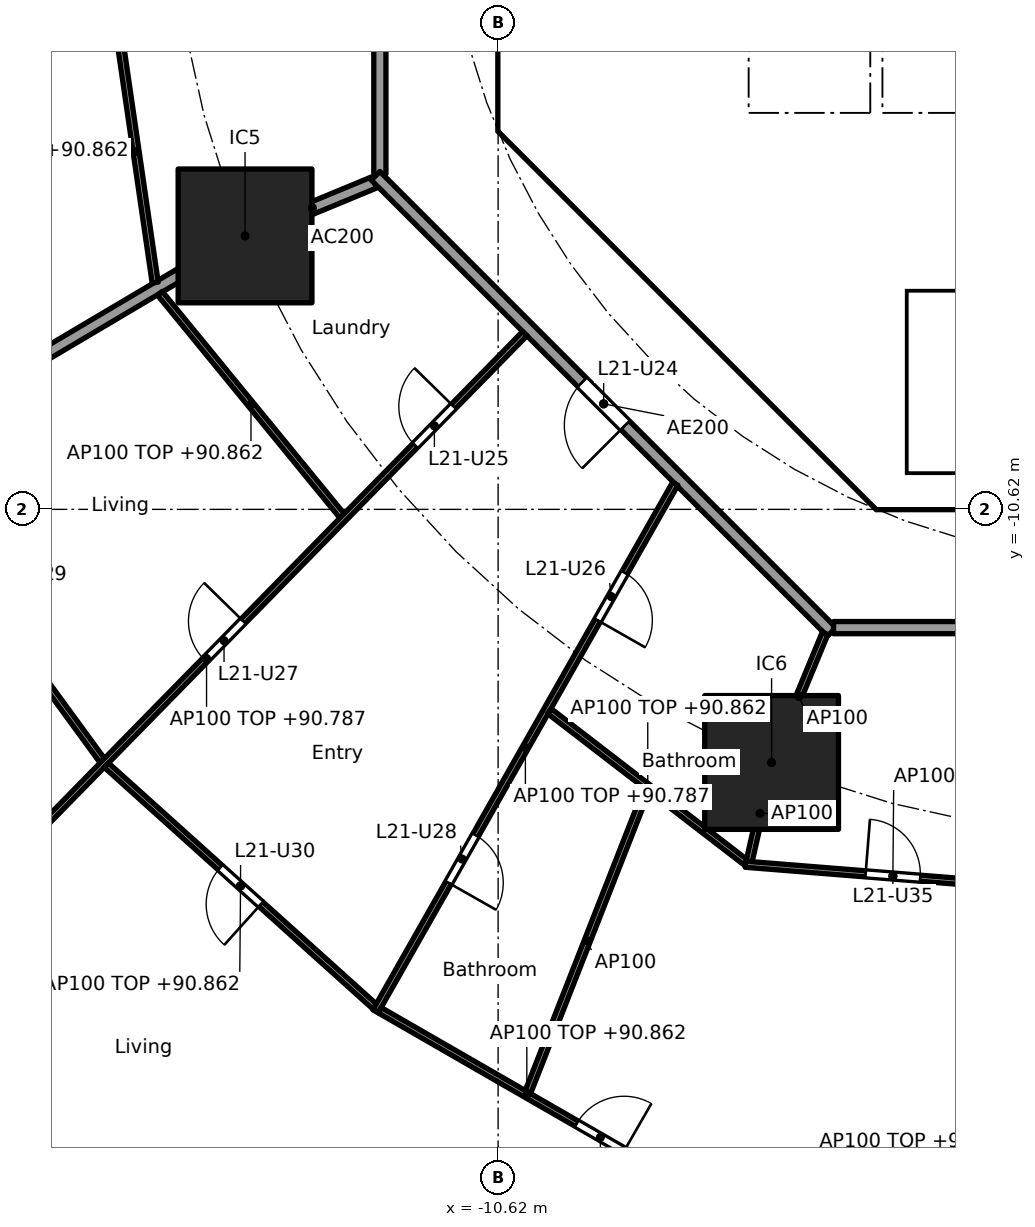
"""IFC4 building model, lengths in metres.
Left out: names, types, materials, properties, quantities, classifications, styles, units other than length and angle.
Written with IfcOpenShell. Run it as: python <this file> out.ifc"""

import sys

from ifc_helpers import new_model, si_unit, direction, frame, frame_2d, origin, origin_2d, place, context, subcontext, project, spatial, polyline, rectangle, outline, extrude, element, fill, save


model = new_model("IFC4")
c1 = context("Model", 3, precision=1e-05, world=origin(), true_north=direction((0.0, 1.0)))
c2 = subcontext(c1, "Body", "Model", "MODEL_VIEW")
j1 = project(units=[si_unit("LENGTHUNIT", "METRE"), si_unit("PLANEANGLEUNIT", "RADIAN")], contexts=[c1])
p1 = place(None, origin())
s1 = spatial("IfcSite", under=j1, at=p1, CompositionType="ELEMENT")
p2 = place(p1, origin())
s2 = spatial("IfcBuilding", under=s1, at=p2, CompositionType="ELEMENT")
p3 = place(p2, frame((0.0, 0.0, 88.1)))
s3 = spatial("IfcBuildingStorey", under=s2, at=p3, CompositionType="ELEMENT", Elevation=88.1)
for number, where, z_axis, x_axis in (
    (1, (-14.782, -6.123, 0.0), (0.0, 0.0, 1.0), (1.0, 0.0, 0.0)),
    (2, (-6.123, -14.782, 0.0), (0.0, 0.0, 1.0), (1.0, 0.0, 0.0)),
):
    element("IfcColumn", number, at=place(p3, frame(where, z_axis=z_axis, x_axis=x_axis)), inside=s3, PredefinedType="COLUMN", context=c2, shape_type="SweptSolid", body=[
        extrude(rectangle(XDim=2.2, YDim=2.2, at=origin_2d()), origin(), (0.0, 0.0, 1.0), 3.7),
    ])
p4 = place(p3, frame((-10.325, 3.801, 0.0), z_axis=(0.0, 0.0, 1.0), x_axis=(0.0, -1.0, 0.0)))
e3 = element("IfcWall", 3, at=p4, inside=s3, PredefinedType="SHEAR", context=c2, shape_type="SweptSolid", body=[
    extrude(rectangle(XDim=7.602, YDim=0.6, at=frame_2d((3.801, 0.0))), origin(), (0.0, 0.0, 1.0), 3.44),
])
p5 = place(p4, frame((0.651, 0.0, 0.0)))
e4 = element("IfcOpeningElement", 4, at=p5, cuts=e3, PredefinedType="OPENING", context=c2, shape_type="SweptSolid", body=[
    extrude(rectangle(XDim=1.5, YDim=2.1, at=frame_2d((0.75, 1.05))), frame((0.0, 0.31, 0.0), z_axis=(0.0, -1.0, 0.0), x_axis=(1.0, 0.0, 0.0)), (0.0, 0.0, 1.0), 0.62),
])
p6 = place(p4, frame((5.451, 0.0, 0.0)))
e5 = element("IfcOpeningElement", 5, at=p6, cuts=e3, PredefinedType="OPENING", context=c2, shape_type="SweptSolid", body=[
    extrude(rectangle(XDim=1.5, YDim=2.1, at=frame_2d((0.75, 1.05))), frame((0.0, 0.31, 0.0), z_axis=(0.0, -1.0, 0.0), x_axis=(1.0, 0.0, 0.0)), (0.0, 0.0, 1.0), 0.62),
])
p7 = place(p3, frame((-9.988, -4.613, 0.0), z_axis=(0.0, 0.0, 1.0), x_axis=(0.707106781187, -0.707106781187, 0.0)))
e6 = element("IfcWall", 6, at=p7, inside=s3, PredefinedType="SHEAR", context=c2, shape_type="SweptSolid", body=[
    extrude(rectangle(XDim=7.602, YDim=0.6, at=frame_2d((3.801, 0.0))), origin(), (0.0, 0.0, 1.0), 3.44),
])
p8 = place(p7, frame((6.151, 0.0, 0.0)))
e7 = element("IfcOpeningElement", 7, at=p8, cuts=e6, PredefinedType="OPENING", context=c2, shape_type="SweptSolid", body=[
    extrude(rectangle(XDim=1.1, YDim=2.1, at=frame_2d((0.55, 1.05))), frame((0.0, 0.31, 0.0), z_axis=(0.0, -1.0, 0.0), x_axis=(1.0, 0.0, 0.0)), (0.0, 0.0, 1.0), 0.62),
])
p9 = place(p3, frame((-6.2, -7.827, 0.0), z_axis=(0.0, 0.0, 1.0), x_axis=(0.0, 1.0, 0.0)))
e8 = element("IfcWall", 8, at=p9, inside=s3, PredefinedType="PARTITIONING", context=c2, shape_type="SweptSolid", body=[
    extrude(rectangle(XDim=3.527, YDim=0.15, at=frame_2d((1.763, 0.0))), origin(), (0.0, 0.0, 1.0), 3.44),
])
p10 = place(p9, frame((2.365, 0.0, 0.0)))
e9 = element("IfcOpeningElement", 9, at=p10, cuts=e8, PredefinedType="OPENING", context=c2, shape_type="SweptSolid", body=[
    extrude(rectangle(XDim=0.9, YDim=2.1, at=frame_2d((0.45, 1.05))), frame((0.0, 0.085, 0.0), z_axis=(0.0, -1.0, 0.0), x_axis=(1.0, 0.0, 0.0)), (0.0, 0.0, 1.0), 0.17),
])
p11 = place(p9, frame((0.489, 0.0, 0.0)))
e10 = element("IfcOpeningElement", 10, at=p11, cuts=e8, PredefinedType="OPENING", context=c2, shape_type="SweptSolid", body=[
    extrude(rectangle(XDim=0.9, YDim=2.1, at=frame_2d((0.45, 1.05))), frame((0.0, 0.085, 0.0), z_axis=(0.0, -1.0, 0.0), x_axis=(1.0, 0.0, 0.0)), (0.0, 0.0, 1.0), 0.17),
])
p12 = place(p3, frame((-4.0, -6.5, 0.0), z_axis=(0.0, 0.0, 1.0), x_axis=(0.0, 1.0, 0.0)))
e11 = element("IfcWall", 11, at=p12, inside=s3, PredefinedType="SOLIDWALL", context=c2, shape_type="SweptSolid", body=[
    extrude(rectangle(XDim=2.2, YDim=0.2, at=frame_2d((1.1, 0.0))), origin(), (0.0, 0.0, 1.0), 3.44),
])
p13 = place(p12, frame((0.65, 0.0, 0.0)))
e12 = element("IfcOpeningElement", 12, at=p13, cuts=e11, PredefinedType="OPENING", context=c2, shape_type="SweptSolid", body=[
    extrude(rectangle(XDim=0.9, YDim=2.1, at=frame_2d((0.45, 1.05))), frame((0.0, 0.11, 0.0), z_axis=(0.0, -1.0, 0.0), x_axis=(1.0, 0.0, 0.0)), (0.0, 0.0, 1.0), 0.22),
])
p14 = place(p3, origin())
e13 = element("IfcWall", 13, at=p14, inside=s3, PredefinedType="SHEAR", context=c2, shape_type="SweptSolid", body=[
    extrude(outline(polyline([(-10.625, -3.801), (-10.025, -3.801), (-10.025, -4.152), (-9.776, -4.401), (-10.2, -4.825), (-10.625, -4.401), (-10.625, -3.801)])), origin(), (0.0, 0.0, 1.0), 3.44),
])
p15 = place(p3, origin())
e14 = element("IfcWall", 14, at=p15, inside=s3, PredefinedType="SHEAR", context=c2, shape_type="SweptSolid", body=[
    extrude(outline(polyline([(-4.152, -10.025), (4.152, -10.025), (4.401, -9.776), (4.825, -10.2), (4.401, -10.625), (-4.401, -10.625), (-4.825, -10.2), (-4.401, -9.776), (-4.152, -10.025)])), origin(), (0.0, 0.0, 1.0), 3.44),
])
p16 = place(p3, origin())
e15 = element("IfcWall", 15, at=p16, inside=s3, PredefinedType="SOLIDWALL", context=c2, shape_type="SweptSolid", body=[
    extrude(outline(polyline([(-6.7, -2.1), (-6.5, -2.1), (-6.5, -4.1), (-4.5, -4.1), (-4.5, -2.1), (-4.3, -2.1), (-4.3, -4.1), (-2.3, -4.1), (-2.3, -2.1), (-2.1, -2.1), (-2.1, -4.1), (-0.1, -4.1), (-0.1, -2.1), (0.1, -2.1), (0.1, -4.1), (2.1, -4.1), (2.1, -2.1), (2.3, -2.1), (2.3, -4.1), (4.3, -4.1), (4.3, -2.1), (4.5, -2.1), (4.5, -4.1), (6.5, -4.1), (6.5, -2.1), (6.7, -2.1), (6.7, -4.3), (-6.7, -4.3), (-6.7, -2.1)])), origin(), (0.0, 0.0, 1.0), 3.44),
])
p17 = place(p3, frame((-10.025, -4.0, 0.0), z_axis=(0.0, 0.0, 1.0), x_axis=(1.0, 0.0, 0.0)))
e16 = element("IfcWall", 16, at=p17, inside=s3, PredefinedType="PARTITIONING", context=c2, shape_type="SweptSolid", body=[
    extrude(rectangle(XDim=3.325, YDim=0.2, at=frame_2d((1.662, 0.0))), origin(), (0.0, 0.0, 1.0), 3.44),
])
p18 = place(p3, frame((-8.301, -5.8, 0.0), z_axis=(0.0, 0.0, 1.0), x_axis=(1.0, 0.0, 0.0)))
e17 = element("IfcWall", 17, at=p18, inside=s3, PredefinedType="PARTITIONING", context=c2, shape_type="SweptSolid", body=[
    extrude(rectangle(XDim=2.026, YDim=0.15, at=frame_2d((1.013, 0.0))), origin(), (0.0, 0.0, 1.0), 3.44),
])
p19 = place(p3, origin())
e18 = element("IfcWall", 18, at=p19, inside=s3, PredefinedType="SOLIDWALL", context=c2, shape_type="SweptSolid", body=[
    extrude(outline(polyline([(-3.9, -10.025), (-4.1, -10.025), (-4.1, -7.025), (-3.9, -7.025), (-3.9, -10.025)])), origin(), (0.0, 0.0, 1.0), 3.44),
])
p20 = place(p3, origin())
e19 = element("IfcWall", 19, at=p20, inside=s3, PredefinedType="SOLIDWALL", context=c2, shape_type="SweptSolid", body=[
    extrude(outline(polyline([(4.1, -7.025), (-4.1, -7.025), (-4.1, -6.5), (4.1, -6.5), (4.1, -7.025)])), origin(), (0.0, 0.0, 1.0), 3.44),
])
p21 = place(p3, frame((-12.657, -5.243, 0.0), z_axis=(0.0, 0.0, 1.0), x_axis=(-0.923876145736, -0.382691608661, 0.0)))
e20 = element("IfcWall", 20, at=p21, inside=s3, PredefinedType="PARTITIONING", context=c2, shape_type="SweptSolid", body=[
    extrude(rectangle(XDim=2.2, YDim=0.2, at=frame_2d((1.1, 0.0))), origin(), (0.0, 0.0, 1.0), 3.44),
])
p22 = place(p3, frame((-14.825, -6.148, 0.0), z_axis=(0.0, 0.0, 1.0), x_axis=(-0.860400431487, -0.509618580408, 0.0)))
e21 = element("IfcWall", 21, at=p22, inside=s3, PredefinedType="PARTITIONING", context=c2, shape_type="SweptSolid", body=[
    extrude(rectangle(XDim=11.688, YDim=0.2, at=frame_2d((5.844, 0.0))), origin(), (0.0, 0.0, 1.0), 2.762),
])
p23 = place(p3, frame((-12.565, 5.304, 0.0), z_axis=(0.0, 0.0, 1.0), x_axis=(0.0, -1.0, 0.0)))
e22 = element("IfcWall", 22, at=p23, inside=s3, PredefinedType="PARTITIONING", context=c2, shape_type="SweptSolid", body=[
    extrude(rectangle(XDim=10.409, YDim=0.2, at=frame_2d((5.205, 0.0))), origin(), (0.0, 0.0, 1.0), 3.44),
])
p24 = place(p23, frame((3.07, 0.0, 0.0)))
e23 = element("IfcOpeningElement", 23, at=p24, cuts=e22, PredefinedType="OPENING", context=c2, shape_type="SweptSolid", body=[
    extrude(rectangle(XDim=1.0, YDim=2.1, at=frame_2d((0.5, 1.05))), frame((0.0, 0.11, 0.0), z_axis=(0.0, -1.0, 0.0), x_axis=(1.0, 0.0, 0.0)), (0.0, 0.0, 1.0), 0.22),
])
p25 = place(p3, frame((-12.635, -5.134, 0.0), z_axis=(0.0, 0.0, 1.0), x_axis=(0.707106781187, -0.707106781187, 0.0)))
e24 = element("IfcWall", 24, at=p25, inside=s3, PredefinedType="PARTITIONING", context=c2, shape_type="SweptSolid", body=[
    extrude(rectangle(XDim=10.609, YDim=0.2, at=frame_2d((5.305, 0.0))), origin(), (0.0, 0.0, 1.0), 3.44),
])
p26 = place(p25, frame((4.804, 0.0, 0.0)))
e25 = element("IfcOpeningElement", 25, at=p26, cuts=e24, PredefinedType="OPENING", context=c2, shape_type="SweptSolid", body=[
    extrude(rectangle(XDim=1.0, YDim=2.1, at=frame_2d((0.5, 1.05))), frame((0.0, 0.11, 0.0), z_axis=(0.0, -1.0, 0.0), x_axis=(1.0, 0.0, 0.0)), (0.0, 0.0, 1.0), 0.22),
])
p27 = place(p3, frame((-5.104, -12.565, 0.0), z_axis=(0.0, 0.0, 1.0), x_axis=(1.0, 0.0, 0.0)))
e26 = element("IfcWall", 26, at=p27, inside=s3, PredefinedType="PARTITIONING", context=c2, shape_type="SweptSolid", body=[
    extrude(rectangle(XDim=10.409, YDim=0.2, at=frame_2d((5.205, 0.0))), origin(), (0.0, 0.0, 1.0), 3.44),
])
p28 = place(p3, frame((-16.888, -2.577, 0.0), z_axis=(0.0, 0.0, 1.0), x_axis=(0.144228053649, -0.989544475272, 0.0)))
e27 = element("IfcWall", 27, at=p28, inside=s3, PredefinedType="PARTITIONING", context=c2, shape_type="SweptSolid", body=[
    extrude(rectangle(XDim=4.359, YDim=0.1, at=frame_2d((2.179, 0.0))), origin(), (0.0, 0.0, 1.0), 2.762),
])
p29 = place(p3, frame((-16.182, -7.067, 0.0), z_axis=(0.0, 0.0, 1.0), x_axis=(0.633400832951, -0.773823871962, 0.0)))
e28 = element("IfcWall", 28, at=p29, inside=s3, PredefinedType="PARTITIONING", context=c2, shape_type="SweptSolid", body=[
    extrude(rectangle(XDim=4.729, YDim=0.1, at=frame_2d((2.365, 0.0))), origin(), (0.0, 0.0, 1.0), 2.762),
])
p30 = place(p3, frame((-20.76, -9.779, 0.0), z_axis=(0.0, 0.0, 1.0), x_axis=(0.589597019189, -0.807697564045, 0.0)))
e29 = element("IfcWall", 29, at=p30, inside=s3, PredefinedType="PARTITIONING", context=c2, shape_type="SweptSolid", body=[
    extrude(rectangle(XDim=6.158, YDim=0.1, at=frame_2d((3.079, 0.0))), origin(), (0.0, 0.0, 1.0), 2.762),
])
p31 = place(p30, frame((2.629, 0.0, 0.0)))
e30 = element("IfcOpeningElement", 30, at=p31, cuts=e29, PredefinedType="OPENING", context=c2, shape_type="SweptSolid", body=[
    extrude(rectangle(XDim=0.9, YDim=2.1, at=frame_2d((0.45, 1.05))), frame((0.0, 0.06, 0.0), z_axis=(0.0, -1.0, 0.0), x_axis=(1.0, 0.0, 0.0)), (0.0, 0.0, 1.0), 0.12),
])
p32 = place(p3, frame((-10.181, -7.729, 0.0), z_axis=(0.0, 0.0, 1.0), x_axis=(-0.699708106083, -0.714428839201, 0.0)))
e31 = element("IfcWall", 31, at=p32, inside=s3, PredefinedType="PARTITIONING", context=c2, shape_type="SweptSolid", body=[
    extrude(rectangle(XDim=14.959, YDim=0.1, at=frame_2d((7.48, 0.0))), origin(), (0.0, 0.0, 1.0), 2.687),
])
p33 = place(p32, frame((1.675, 0.0, 0.0)))
e32 = element("IfcOpeningElement", 32, at=p33, cuts=e31, PredefinedType="OPENING", context=c2, shape_type="SweptSolid", body=[
    extrude(rectangle(XDim=0.9, YDim=2.1, at=frame_2d((0.45, 1.05))), frame((0.0, 0.06, 0.0), z_axis=(0.0, -1.0, 0.0), x_axis=(1.0, 0.0, 0.0)), (0.0, 0.0, 1.0), 0.12),
])
p34 = place(p32, frame((6.619, 0.0, 0.0)))
e33 = element("IfcOpeningElement", 33, at=p34, cuts=e31, PredefinedType="OPENING", context=c2, shape_type="SweptSolid", body=[
    extrude(rectangle(XDim=0.9, YDim=2.1, at=frame_2d((0.45, 1.05))), frame((0.0, 0.06, 0.0), z_axis=(0.0, -1.0, 0.0), x_axis=(1.0, 0.0, 0.0)), (0.0, 0.0, 1.0), 0.12),
])
p35 = place(p3, frame((-17.063, -14.827, 0.0), z_axis=(0.0, 0.0, 1.0), x_axis=(0.743478142868, -0.668760234373, 0.0)))
e34 = element("IfcWall", 34, at=p35, inside=s3, PredefinedType="PARTITIONING", context=c2, shape_type="SweptSolid", body=[
    extrude(rectangle(XDim=5.937, YDim=0.1, at=frame_2d((2.969, 0.0))), origin(), (0.0, 0.0, 1.0), 2.762),
])
p36 = place(p35, frame((2.519, 0.0, 0.0)))
e35 = element("IfcOpeningElement", 35, at=p36, cuts=e34, PredefinedType="OPENING", context=c2, shape_type="SweptSolid", body=[
    extrude(rectangle(XDim=0.9, YDim=2.1, at=frame_2d((0.45, 1.05))), frame((0.0, 0.06, 0.0), z_axis=(0.0, -1.0, 0.0), x_axis=(1.0, 0.0, 0.0)), (0.0, 0.0, 1.0), 0.12),
])
p37 = place(p3, frame((-7.707, -10.198, 0.0), z_axis=(0.0, 0.0, 1.0), x_axis=(-0.493963587489, -0.869482589955, 0.0)))
e36 = element("IfcWall", 36, at=p37, inside=s3, PredefinedType="PARTITIONING", context=c2, shape_type="SweptSolid", body=[
    extrude(rectangle(XDim=9.978, YDim=0.1, at=frame_2d((4.989, 0.0))), origin(), (0.0, 0.0, 1.0), 2.687),
])
p38 = place(p37, frame((1.684, 0.0, 0.0)))
e37 = element("IfcOpeningElement", 37, at=p38, cuts=e36, PredefinedType="OPENING", context=c2, shape_type="SweptSolid", body=[
    extrude(rectangle(XDim=0.9, YDim=2.1, at=frame_2d((0.45, 1.05))), frame((0.0, 0.06, 0.0), z_axis=(0.0, -1.0, 0.0), x_axis=(1.0, 0.0, 0.0)), (0.0, 0.0, 1.0), 0.12),
])
p39 = place(p37, frame((6.648, 0.0, 0.0)))
e38 = element("IfcOpeningElement", 38, at=p39, cuts=e36, PredefinedType="OPENING", context=c2, shape_type="SweptSolid", body=[
    extrude(rectangle(XDim=0.9, YDim=2.1, at=frame_2d((0.45, 1.05))), frame((0.0, 0.06, 0.0), z_axis=(0.0, -1.0, 0.0), x_axis=(1.0, 0.0, 0.0)), (0.0, 0.0, 1.0), 0.12),
])
p40 = place(p3, frame((-9.775, -13.939, 0.0), z_axis=(0.0, 0.0, 1.0), x_axis=(0.792156642473, -0.61031783014, 0.0)))
e39 = element("IfcWall", 39, at=p40, inside=s3, PredefinedType="PARTITIONING", context=c2, shape_type="SweptSolid", body=[
    extrude(rectangle(XDim=4.08, YDim=0.1, at=frame_2d((2.04, 0.0))), origin(), (0.0, 0.0, 1.0), 2.762),
])
p41 = place(p3, frame((-12.568, -18.856, 0.0), z_axis=(0.0, 0.0, 1.0), x_axis=(0.866532513598, -0.499120629585, 0.0)))
e40 = element("IfcWall", 40, at=p41, inside=s3, PredefinedType="PARTITIONING", context=c2, shape_type="SweptSolid", body=[
    extrude(rectangle(XDim=5.585, YDim=0.1, at=frame_2d((2.792, 0.0))), origin(), (0.0, 0.0, 1.0), 2.762),
])
p42 = place(p41, frame((3.739, 0.0, 0.0)))
e41 = element("IfcOpeningElement", 41, at=p42, cuts=e40, PredefinedType="OPENING", context=c2, shape_type="SweptSolid", body=[
    extrude(rectangle(XDim=0.9, YDim=2.1, at=frame_2d((0.45, 1.05))), frame((0.0, 0.06, 0.0), z_axis=(0.0, -1.0, 0.0), x_axis=(1.0, 0.0, 0.0)), (0.0, 0.0, 1.0), 0.12),
])
p43 = place(p3, frame((-8.177, -15.231, 0.0), z_axis=(0.0, 0.0, 1.0), x_axis=(-0.365520869553, -0.930803144559, 0.0)))
e42 = element("IfcWall", 42, at=p43, inside=s3, PredefinedType="PARTITIONING", context=c2, shape_type="SweptSolid", body=[
    extrude(rectangle(XDim=5.342, YDim=0.1, at=frame_2d((2.671, 0.0))), origin(), (0.0, 0.0, 1.0), 3.44),
])
p44 = place(p3, frame((-5.243, -12.657, 0.0), z_axis=(0.0, 0.0, 1.0), x_axis=(-0.382719158442, -0.923864733477, 0.0)))
e43 = element("IfcWall", 43, at=p44, inside=s3, PredefinedType="PARTITIONING", context=c2, shape_type="SweptSolid", body=[
    extrude(rectangle(XDim=2.25, YDim=0.1, at=frame_2d((1.125, 0.0))), origin(), (0.0, 0.0, 1.0), 3.44),
])
p45 = place(p3, frame((-6.134, -14.831, 0.0), z_axis=(0.0, 0.0, 1.0), x_axis=(-0.221269290858, -0.975212746493, 0.0)))
e44 = element("IfcWall", 44, at=p45, inside=s3, PredefinedType="PARTITIONING", context=c2, shape_type="SweptSolid", body=[
    extrude(rectangle(XDim=1.62, YDim=0.1, at=frame_2d((0.81, 0.0))), origin(), (0.0, 0.0, 1.0), 3.44),
])
p46 = place(p3, frame((-6.553, -16.456, 0.0), z_axis=(0.0, 0.0, 1.0), x_axis=(0.996817033118, -0.079723286975, 0.0)))
e45 = element("IfcWall", 45, at=p46, inside=s3, PredefinedType="PARTITIONING", context=c2, shape_type="SweptSolid", body=[
    extrude(rectangle(XDim=4.866, YDim=0.1, at=frame_2d((2.433, 0.0))), origin(), (0.0, 0.0, 1.0), 2.762),
])
p47 = place(p46, frame((1.983, 0.0, 0.0)))
e46 = element("IfcOpeningElement", 46, at=p47, cuts=e45, PredefinedType="OPENING", context=c2, shape_type="SweptSolid", body=[
    extrude(rectangle(XDim=0.9, YDim=2.1, at=frame_2d((0.45, 1.05))), frame((0.0, 0.06, 0.0), z_axis=(0.0, -1.0, 0.0), x_axis=(1.0, 0.0, 0.0)), (0.0, 0.0, 1.0), 0.12),
])
p48 = place(p10, origin())
e47 = element("IfcDoor", 47, at=p48, inside=s3, OperationType="SINGLE_SWING_RIGHT", PredefinedType="DOOR", context=c2, shape_type="SweptSolid", body=[
    extrude(rectangle(XDim=0.9, YDim=2.1, at=frame_2d((0.45, 1.05))), frame((0.0, 0.025, 0.0), z_axis=(0.0, -1.0, 0.0), x_axis=(1.0, 0.0, 0.0)), (0.0, 0.0, 1.0), 0.05),
])
fill(e9, e47)
p49 = place(p11, origin())
e48 = element("IfcDoor", 48, at=p49, inside=s3, OperationType="SINGLE_SWING_RIGHT", PredefinedType="DOOR", context=c2, shape_type="SweptSolid", body=[
    extrude(rectangle(XDim=0.9, YDim=2.1, at=frame_2d((0.45, 1.05))), frame((0.0, 0.025, 0.0), z_axis=(0.0, -1.0, 0.0), x_axis=(1.0, 0.0, 0.0)), (0.0, 0.0, 1.0), 0.05),
])
fill(e10, e48)
p50 = place(p13, frame((0.9, 0.0, 0.0), x_axis=(-1.0, 0.0, 0.0)))
e49 = element("IfcDoor", 49, at=p50, inside=s3, OperationType="SINGLE_SWING_LEFT", PredefinedType="DOOR", context=c2, shape_type="SweptSolid", body=[
    extrude(rectangle(XDim=0.9, YDim=2.1, at=frame_2d((0.45, 1.05))), frame((0.0, 0.025, 0.0), z_axis=(0.0, -1.0, 0.0), x_axis=(1.0, 0.0, 0.0)), (0.0, 0.0, 1.0), 0.05),
])
fill(e12, e49)
p51 = place(p6, origin())
e50 = element("IfcDoor", 50, at=p51, inside=s3, OperationType="DOUBLE_DOOR_SINGLE_SWING", PredefinedType="DOOR", context=c2, shape_type="SweptSolid", body=[
    extrude(rectangle(XDim=1.5, YDim=2.1, at=frame_2d((0.75, 1.05))), frame((0.0, 0.025, 0.0), z_axis=(0.0, -1.0, 0.0), x_axis=(1.0, 0.0, 0.0)), (0.0, 0.0, 1.0), 0.05),
])
fill(e5, e50)
p52 = place(p8, origin())
e51 = element("IfcDoor", 51, at=p52, inside=s3, OperationType="SINGLE_SWING_LEFT", PredefinedType="DOOR", context=c2, shape_type="SweptSolid", body=[
    extrude(rectangle(XDim=1.1, YDim=2.1, at=frame_2d((0.55, 1.05))), frame((0.0, 0.025, 0.0), z_axis=(0.0, -1.0, 0.0), x_axis=(1.0, 0.0, 0.0)), (0.0, 0.0, 1.0), 0.05),
])
fill(e7, e51)
p53 = place(p26, frame((1.0, 0.0, 0.0), x_axis=(-1.0, 0.0, 0.0)))
e52 = element("IfcDoor", 52, at=p53, inside=s3, OperationType="SINGLE_SWING_LEFT", PredefinedType="DOOR", context=c2, shape_type="SweptSolid", body=[
    extrude(rectangle(XDim=1.0, YDim=2.1, at=frame_2d((0.5, 1.05))), frame((0.0, 0.025, 0.0), z_axis=(0.0, -1.0, 0.0), x_axis=(1.0, 0.0, 0.0)), (0.0, 0.0, 1.0), 0.05),
])
fill(e25, e52)
p54 = place(p33, frame((0.9, 0.0, 0.0), x_axis=(-1.0, 0.0, 0.0)))
e53 = element("IfcDoor", 53, at=p54, inside=s3, OperationType="SINGLE_SWING_RIGHT", PredefinedType="DOOR", context=c2, shape_type="SweptSolid", body=[
    extrude(rectangle(XDim=0.9, YDim=2.1, at=frame_2d((0.45, 1.05))), frame((0.0, 0.025, 0.0), z_axis=(0.0, -1.0, 0.0), x_axis=(1.0, 0.0, 0.0)), (0.0, 0.0, 1.0), 0.05),
])
fill(e32, e53)
p55 = place(p38, origin())
e54 = element("IfcDoor", 54, at=p55, inside=s3, OperationType="SINGLE_SWING_RIGHT", PredefinedType="DOOR", context=c2, shape_type="SweptSolid", body=[
    extrude(rectangle(XDim=0.9, YDim=2.1, at=frame_2d((0.45, 1.05))), frame((0.0, 0.025, 0.0), z_axis=(0.0, -1.0, 0.0), x_axis=(1.0, 0.0, 0.0)), (0.0, 0.0, 1.0), 0.05),
])
fill(e37, e54)
p56 = place(p34, frame((0.9, 0.0, 0.0), x_axis=(-1.0, 0.0, 0.0)))
e55 = element("IfcDoor", 55, at=p56, inside=s3, OperationType="SINGLE_SWING_RIGHT", PredefinedType="DOOR", context=c2, shape_type="SweptSolid", body=[
    extrude(rectangle(XDim=0.9, YDim=2.1, at=frame_2d((0.45, 1.05))), frame((0.0, 0.025, 0.0), z_axis=(0.0, -1.0, 0.0), x_axis=(1.0, 0.0, 0.0)), (0.0, 0.0, 1.0), 0.05),
])
fill(e33, e55)
p57 = place(p39, origin())
e56 = element("IfcDoor", 56, at=p57, inside=s3, OperationType="SINGLE_SWING_RIGHT", PredefinedType="DOOR", context=c2, shape_type="SweptSolid", body=[
    extrude(rectangle(XDim=0.9, YDim=2.1, at=frame_2d((0.45, 1.05))), frame((0.0, 0.025, 0.0), z_axis=(0.0, -1.0, 0.0), x_axis=(1.0, 0.0, 0.0)), (0.0, 0.0, 1.0), 0.05),
])
fill(e38, e56)
p58 = place(p36, frame((0.9, 0.0, 0.0), x_axis=(-1.0, 0.0, 0.0)))
e57 = element("IfcDoor", 57, at=p58, inside=s3, OperationType="SINGLE_SWING_LEFT", PredefinedType="DOOR", context=c2, shape_type="SweptSolid", body=[
    extrude(rectangle(XDim=0.9, YDim=2.1, at=frame_2d((0.45, 1.05))), frame((0.0, 0.025, 0.0), z_axis=(0.0, -1.0, 0.0), x_axis=(1.0, 0.0, 0.0)), (0.0, 0.0, 1.0), 0.05),
])
fill(e35, e57)
p59 = place(p42, origin())
e58 = element("IfcDoor", 58, at=p59, inside=s3, OperationType="SINGLE_SWING_RIGHT", PredefinedType="DOOR", context=c2, shape_type="SweptSolid", body=[
    extrude(rectangle(XDim=0.9, YDim=2.1, at=frame_2d((0.45, 1.05))), frame((0.0, 0.025, 0.0), z_axis=(0.0, -1.0, 0.0), x_axis=(1.0, 0.0, 0.0)), (0.0, 0.0, 1.0), 0.05),
])
fill(e41, e58)
p60 = place(p47, origin())
e59 = element("IfcDoor", 59, at=p60, inside=s3, OperationType="SINGLE_SWING_LEFT", PredefinedType="DOOR", context=c2, shape_type="SweptSolid", body=[
    extrude(rectangle(XDim=0.9, YDim=2.1, at=frame_2d((0.45, 1.05))), frame((0.0, 0.025, 0.0), z_axis=(0.0, -1.0, 0.0), x_axis=(1.0, 0.0, 0.0)), (0.0, 0.0, 1.0), 0.05),
])
fill(e46, e59)
save(model, sys.argv[1])
